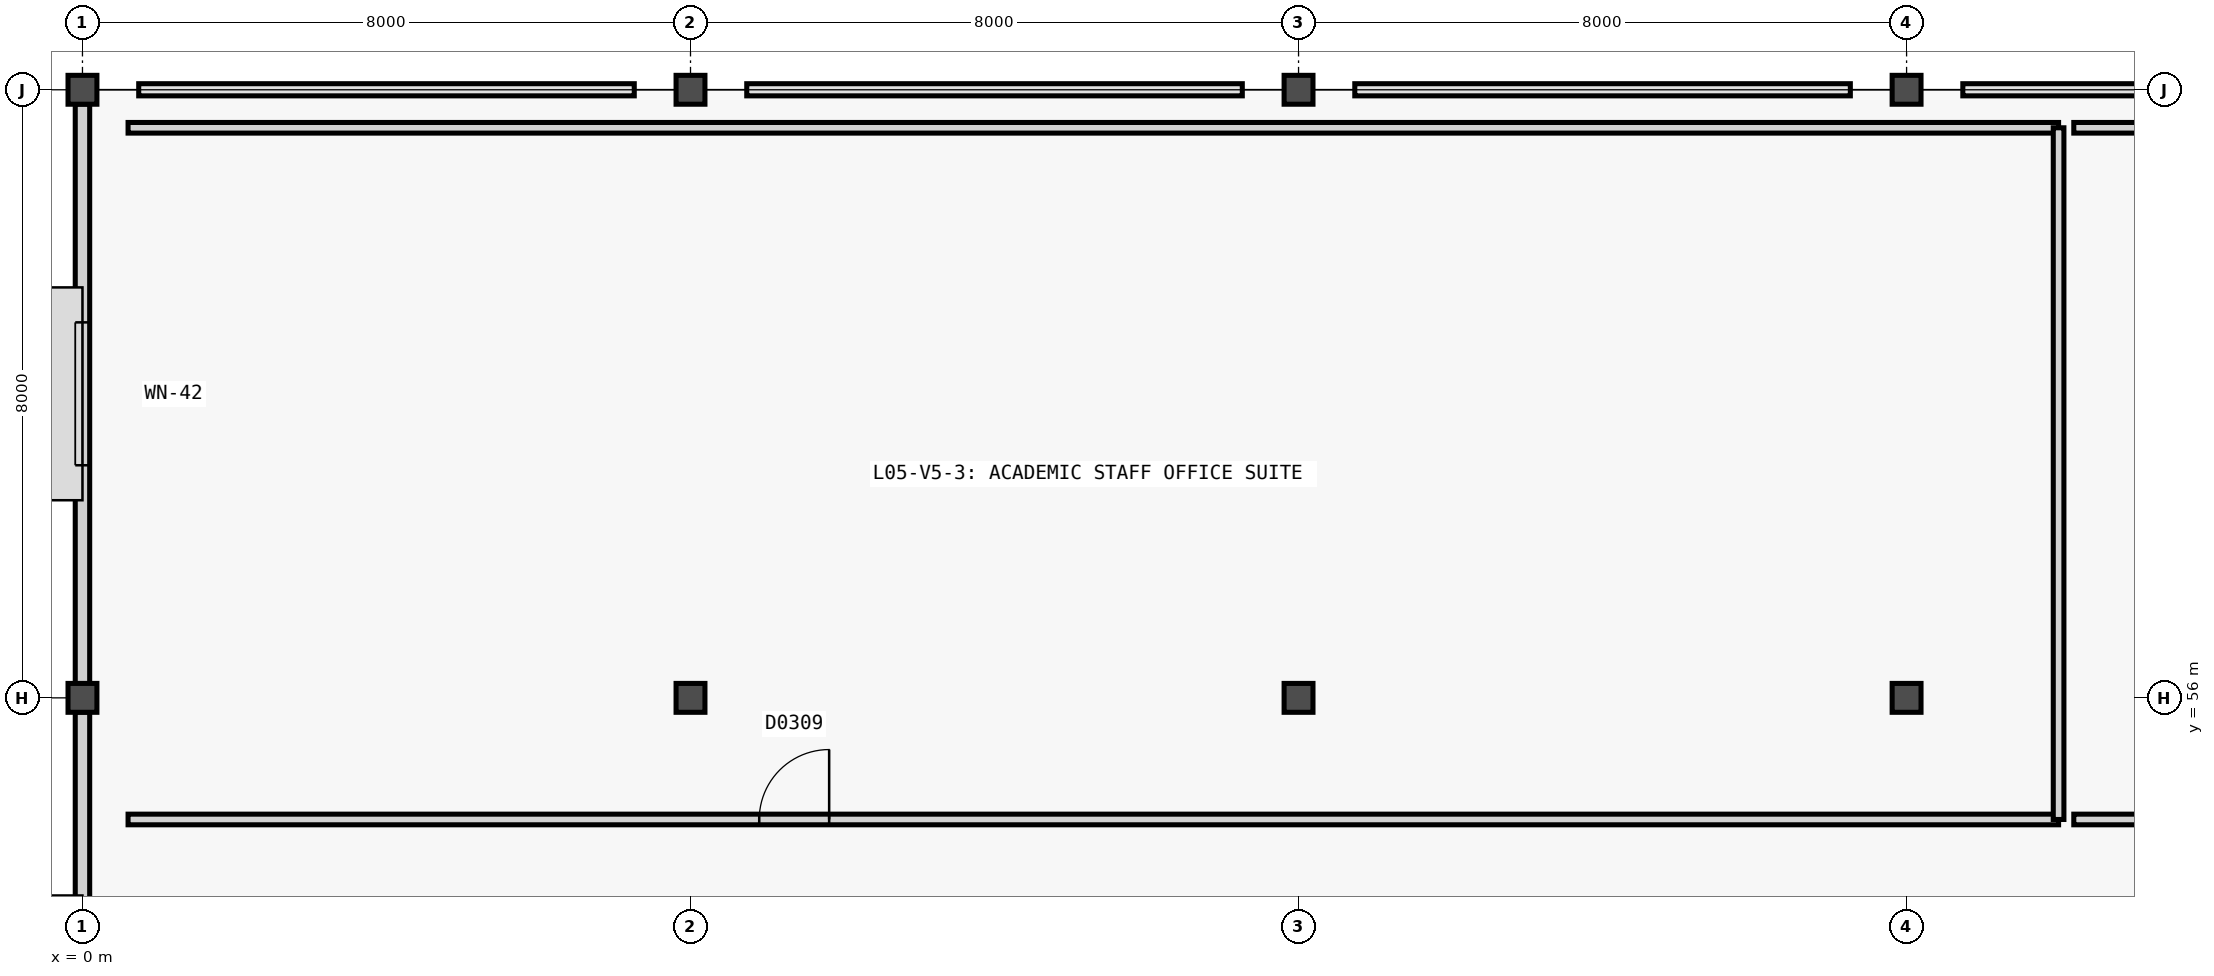
"""IFC4 building model, lengths in metres.
Left out: names, types, materials, properties, quantities, classifications, styles, units other than length and angle.
Written with IfcOpenShell. Run it as: python <this file> out.ifc"""

import sys

from ifc_helpers import new_model, si_unit, direction, frame, frame_2d, origin, origin_2d, place, context, subcontext, project, spatial, rectangle, extrude, element, fill, save


model = new_model("IFC4")
c1 = context("Model", 3, precision=1e-05, world=origin(), true_north=direction((0.0, 1.0)))
c2 = subcontext(c1, "Body", "Model", "MODEL_VIEW")
j1 = project(units=[si_unit("LENGTHUNIT", "METRE"), si_unit("PLANEANGLEUNIT", "RADIAN")], contexts=[c1])
p1 = place(None, origin())
s1 = spatial("IfcSite", under=j1, at=p1, CompositionType="ELEMENT")
p2 = place(p1, origin())
s2 = spatial("IfcBuilding", under=s1, at=p2, CompositionType="ELEMENT")
p3 = place(p2, frame((0.0, 0.0, 21.6)))
s3 = spatial("IfcBuildingStorey", under=s2, at=p3, CompositionType="ELEMENT", Elevation=21.6)
for number, where, z_axis, x_axis in (
    (1, (0.0, 56.0, 0.0), (0.0, 0.0, 1.0), (1.0, 0.0, 0.0)),
    (2, (0.0, 64.0, 0.0), (0.0, 0.0, 1.0), (1.0, 0.0, 0.0)),
    (3, (8.0, 56.0, 0.0), (0.0, 0.0, 1.0), (1.0, 0.0, 0.0)),
    (4, (8.0, 64.0, 0.0), (0.0, 0.0, 1.0), (1.0, 0.0, 0.0)),
    (5, (16.0, 56.0, 0.0), (0.0, 0.0, 1.0), (1.0, 0.0, 0.0)),
    (6, (16.0, 64.0, 0.0), (0.0, 0.0, 1.0), (1.0, 0.0, 0.0)),
    (7, (24.0, 56.0, 0.0), (0.0, 0.0, 1.0), (1.0, 0.0, 0.0)),
    (8, (24.0, 64.0, 0.0), (0.0, 0.0, 1.0), (1.0, 0.0, 0.0)),
):
    element("IfcColumn", number, at=place(p3, frame(where, z_axis=z_axis, x_axis=x_axis)), inside=s3, PredefinedType="COLUMN", context=c2, shape_type="SweptSolid", body=[
        extrude(rectangle(XDim=0.38, YDim=0.38, at=origin_2d()), origin(), (0.0, 0.0, 1.0), 3.6),
    ])
p4 = place(p3, frame((0.0, 48.188, 0.0), z_axis=(0.0, 0.0, 1.0), x_axis=(0.0, 1.0, 0.0)))
e9 = element("IfcWall", 9, at=p4, inside=s3, PredefinedType="SOLIDWALL", context=c2, shape_type="SweptSolid", body=[
    extrude(rectangle(XDim=7.624, YDim=0.19, at=frame_2d((3.812, 0.0))), origin(), (0.0, 0.0, 1.0), 2.8),
])
p5 = place(p4, frame((2.952, 0.0, 0.88)))
e10 = element("IfcOpeningElement", 10, at=p5, cuts=e9, PredefinedType="OPENING", context=c2, shape_type="SweptSolid", body=[
    extrude(rectangle(XDim=1.72, YDim=1.62, at=frame_2d((0.86, 0.81))), frame((0.0, 0.105, 0.0), z_axis=(0.0, -1.0, 0.0), x_axis=(1.0, 0.0, 0.0)), (0.0, 0.0, 1.0), 0.21),
])
p6 = place(p3, frame((0.0, 56.188, 0.0), z_axis=(0.0, 0.0, 1.0), x_axis=(0.0, 1.0, 0.0)))
e11 = element("IfcWall", 11, at=p6, inside=s3, PredefinedType="SOLIDWALL", context=c2, shape_type="SweptSolid", body=[
    extrude(rectangle(XDim=7.624, YDim=0.19, at=frame_2d((3.812, 0.0))), origin(), (0.0, 0.0, 1.0), 2.8),
])
p7 = place(p6, frame((2.872, 0.0, 0.88)))
e12 = element("IfcOpeningElement", 12, at=p7, cuts=e11, PredefinedType="OPENING", context=c2, shape_type="SweptSolid", body=[
    extrude(rectangle(XDim=1.88, YDim=1.68, at=frame_2d((0.94, 0.84))), frame((0.0, 0.105, 0.0), z_axis=(0.0, -1.0, 0.0), x_axis=(1.0, 0.0, 0.0)), (0.0, 0.0, 1.0), 0.21),
])
p8 = place(p3, frame((0.6, 54.4, 0.0), z_axis=(0.0, 0.0, 1.0), x_axis=(1.0, 0.0, 0.0)))
e13 = element("IfcWall", 13, at=p8, inside=s3, PredefinedType="PARTITIONING", context=c2, shape_type="SweptSolid", body=[
    extrude(rectangle(XDim=25.4, YDim=0.14, at=frame_2d((12.7, 0.0))), origin(), (0.0, 0.0, 1.0), 3.34),
])
p9 = place(p8, frame((8.304, 0.0, 0.0)))
e14 = element("IfcOpeningElement", 14, at=p9, cuts=e13, PredefinedType="OPENING", context=c2, shape_type="SweptSolid", body=[
    extrude(rectangle(XDim=0.92, YDim=2.15, at=frame_2d((0.46, 1.075))), frame((0.0, 0.08, 0.0), z_axis=(0.0, -1.0, 0.0), x_axis=(1.0, 0.0, 0.0)), (0.0, 0.0, 1.0), 0.16),
])
p10 = place(p3, frame((0.6, 63.5, 0.0), z_axis=(0.0, 0.0, 1.0), x_axis=(1.0, 0.0, 0.0)))
e15 = element("IfcWall", 15, at=p10, inside=s3, PredefinedType="PARTITIONING", context=c2, shape_type="SweptSolid", body=[
    extrude(rectangle(XDim=25.4, YDim=0.14, at=frame_2d((12.7, 0.0))), origin(), (0.0, 0.0, 1.0), 3.34),
])
p11 = place(p3, frame((26.0, 54.4, 0.0), z_axis=(0.0, 0.0, 1.0), x_axis=(0.0, 1.0, 0.0)))
e16 = element("IfcWall", 16, at=p11, inside=s3, PredefinedType="PARTITIONING", context=c2, shape_type="SweptSolid", body=[
    extrude(rectangle(XDim=9.1, YDim=0.14, at=frame_2d((4.55, 0.0))), origin(), (0.0, 0.0, 1.0), 3.34),
])
p12 = place(p3, frame((26.2, 54.4, 0.0), z_axis=(0.0, 0.0, 1.0), x_axis=(1.0, 0.0, 0.0)))
e17 = element("IfcWall", 17, at=p12, inside=s3, PredefinedType="PARTITIONING", context=c2, shape_type="SweptSolid", body=[
    extrude(rectangle(XDim=21.3, YDim=0.14, at=frame_2d((10.65, 0.0))), origin(), (0.0, 0.0, 1.0), 3.34),
])
p13 = place(p12, frame((9.775, 0.0, 0.0)))
e18 = element("IfcOpeningElement", 18, at=p13, cuts=e17, PredefinedType="OPENING", context=c2, shape_type="SweptSolid", body=[
    extrude(rectangle(XDim=1.75, YDim=2.2, at=frame_2d((0.875, 1.1))), frame((0.0, 0.08, 0.0), z_axis=(0.0, -1.0, 0.0), x_axis=(1.0, 0.0, 0.0)), (0.0, 0.0, 1.0), 0.16),
])
p14 = place(p3, frame((26.2, 63.5, 0.0), z_axis=(0.0, 0.0, 1.0), x_axis=(1.0, 0.0, 0.0)))
e19 = element("IfcWall", 19, at=p14, inside=s3, PredefinedType="PARTITIONING", context=c2, shape_type="SweptSolid", body=[
    extrude(rectangle(XDim=21.3, YDim=0.14, at=frame_2d((10.65, 0.0))), origin(), (0.0, 0.0, 1.0), 3.34),
])
p15 = place(p7, origin())
e20 = element("IfcWindow", 20, at=p15, inside=s3, PartitioningType="SINGLE_PANEL", PredefinedType="WINDOW", context=c2, shape_type="SweptSolid", body=[
    extrude(rectangle(XDim=1.88, YDim=1.68, at=frame_2d((0.94, 0.84))), frame((0.0, 0.03, 0.0), z_axis=(0.0, -1.0, 0.0), x_axis=(1.0, 0.0, 0.0)), (0.0, 0.0, 1.0), 0.06),
])
fill(e12, e20)
p16 = place(p9, origin())
e21 = element("IfcDoor", 21, at=p16, inside=s3, OperationType="SINGLE_SWING_RIGHT", PredefinedType="DOOR", context=c2, shape_type="SweptSolid", body=[
    extrude(rectangle(XDim=0.92, YDim=2.15, at=frame_2d((0.46, 1.075))), frame((0.0, 0.025, 0.0), z_axis=(0.0, -1.0, 0.0), x_axis=(1.0, 0.0, 0.0)), (0.0, 0.0, 1.0), 0.05),
])
fill(e14, e21)
save(model, sys.argv[1])
